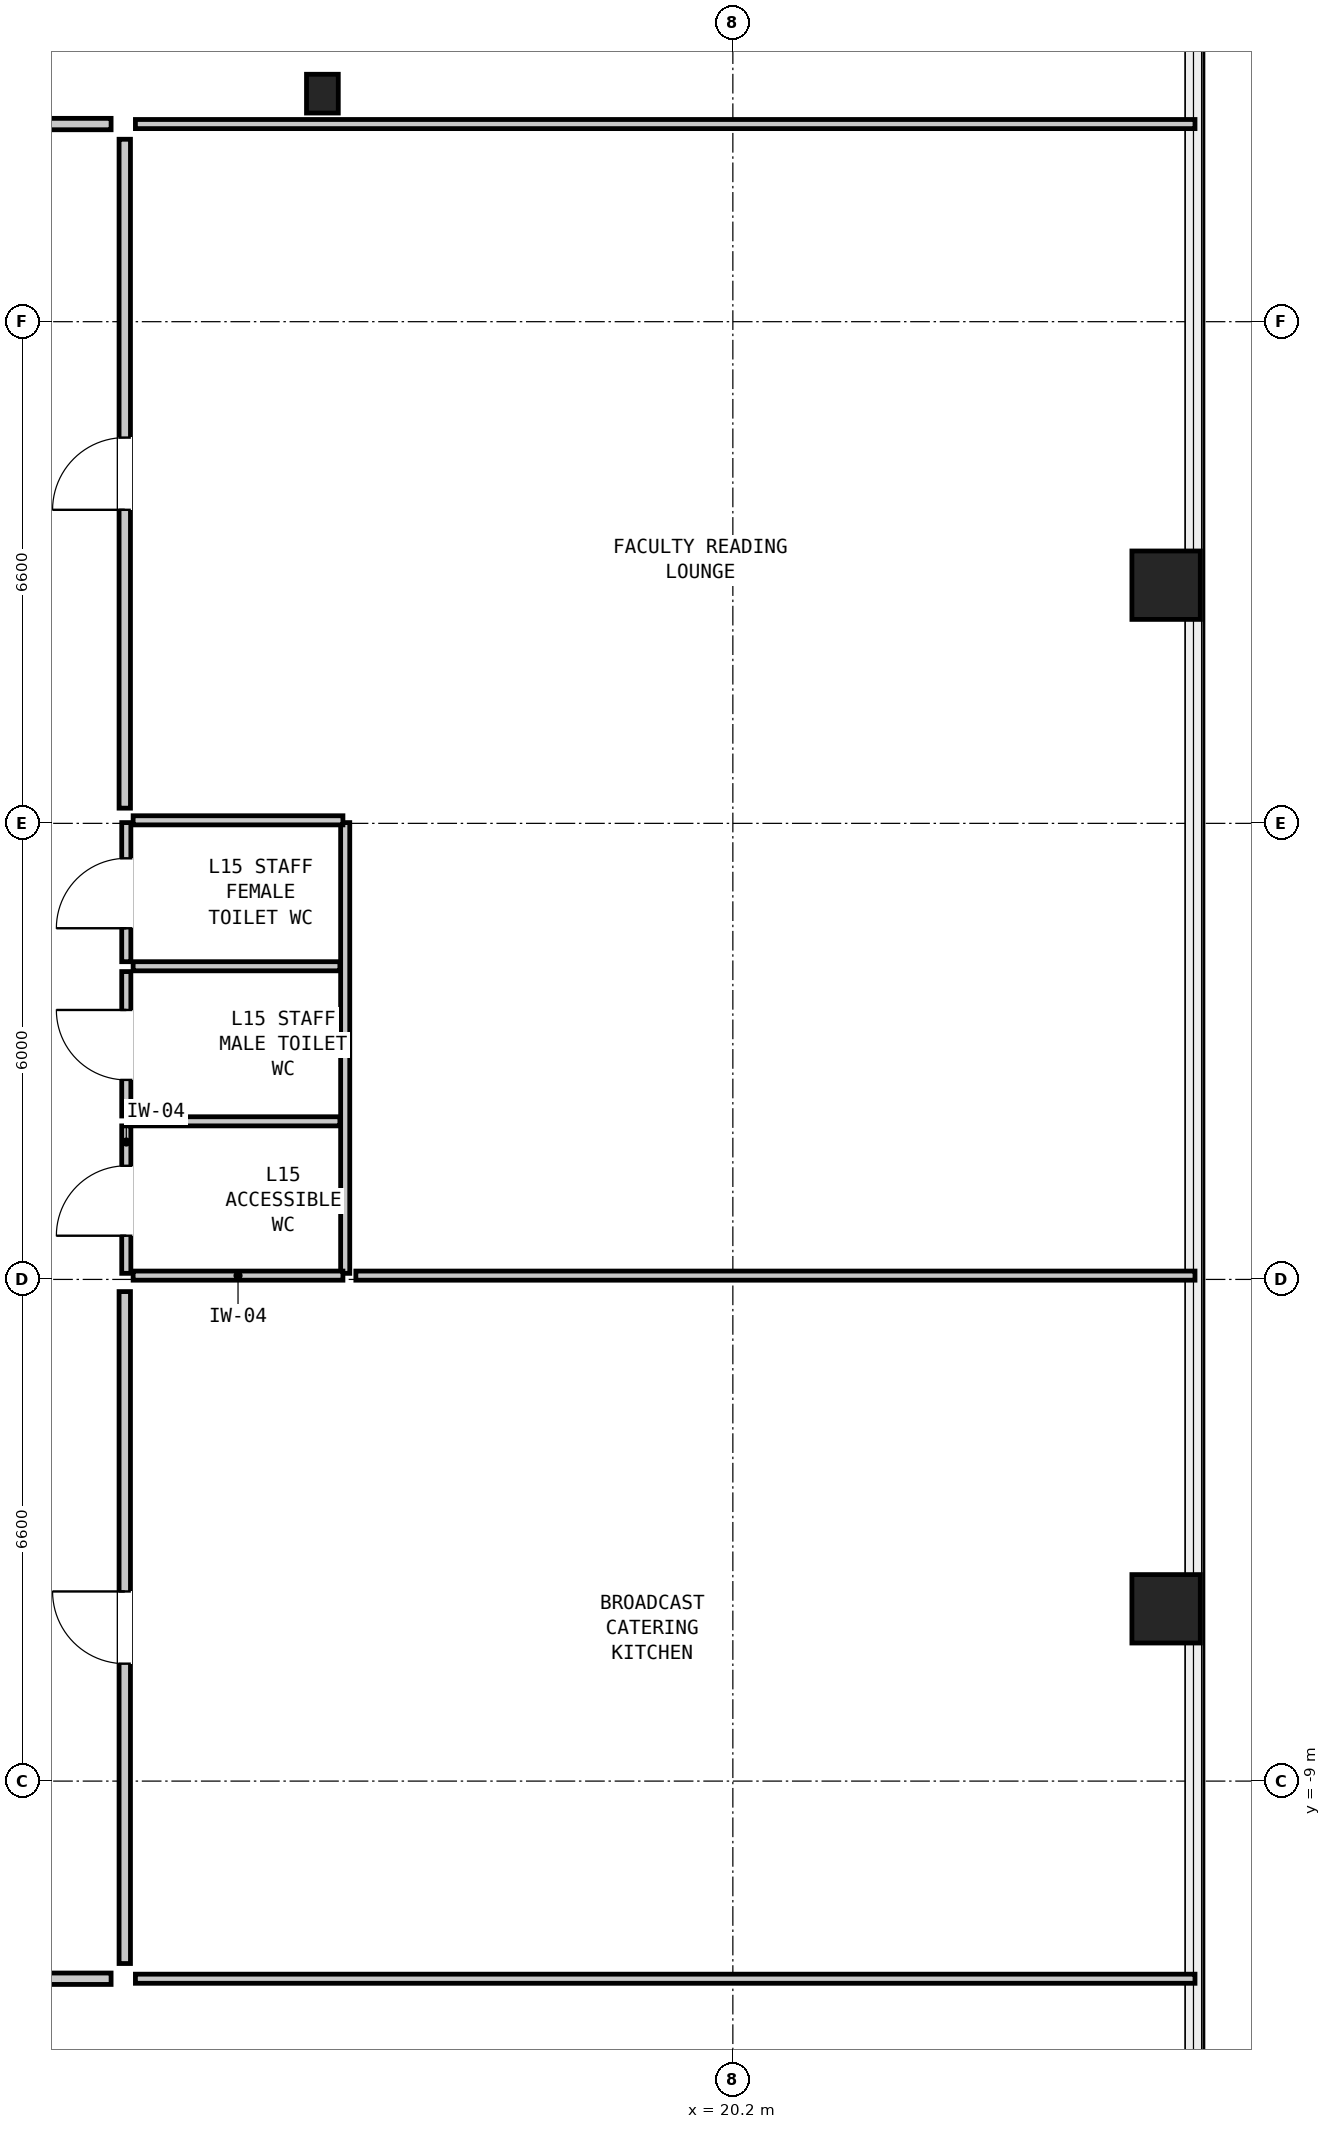
"""IFC4 building model, lengths in metres.
Left out: names, types, materials, properties, quantities, classifications, styles, units other than length and angle.
Written with IfcOpenShell. Run it as: python <this file> out.ifc"""

import sys

from ifc_helpers import new_model, si_unit, direction, frame, frame_2d, origin, origin_2d, place, context, subcontext, project, spatial, rectangle, hollow_rectangle, i_section, extrude, element, fill, save


model = new_model("IFC4")
c1 = context("Model", 3, precision=1e-05, world=origin(), true_north=direction((0.0, 1.0)))
c2 = subcontext(c1, "Body", "Model", "MODEL_VIEW")
j1 = project(units=[si_unit("LENGTHUNIT", "METRE"), si_unit("PLANEANGLEUNIT", "RADIAN")], contexts=[c1])
p1 = place(None, origin())
s1 = spatial("IfcSite", under=j1, at=p1, CompositionType="ELEMENT")
p2 = place(p1, origin())
s2 = spatial("IfcBuilding", under=s1, at=p2, CompositionType="ELEMENT")
p3 = place(p2, frame((0.0, 0.0, 53.55)))
s3 = spatial("IfcBuildingStorey", under=s2, at=p3, CompositionType="ELEMENT", Elevation=53.55)
for number, where, z_axis, x_axis in (
    (1, (25.9, -6.733, 0.0), (0.0, 0.0, 1.0), (0.0, 1.0, 0.0)),
    (2, (25.9, 6.733, 0.0), (0.0, 0.0, 1.0), (0.0, 1.0, 0.0)),
):
    element("IfcColumn", number, at=place(p3, frame(where, z_axis=z_axis, x_axis=x_axis)), inside=s3, PredefinedType="COLUMN", context=c2, shape_type="SweptSolid", body=[
        extrude(hollow_rectangle(XDim=0.9, YDim=0.9, WallThickness=0.055, at=origin_2d()), origin(), (0.0, 0.0, 1.0), 4.35),
    ])
p4 = place(p3, frame((14.8, 13.2, 0.0), z_axis=(0.0, 0.0, 1.0), x_axis=(1.0, 0.0, 0.0)))
e3 = element("IfcColumn", 3, at=p4, inside=s3, PredefinedType="COLUMN", context=c2, shape_type="SweptSolid", body=[
    extrude(i_section(OverallWidth=0.418, OverallDepth=0.51, WebThickness=0.042, FlangeThickness=0.068, at=origin_2d()), origin(), (0.0, 0.0, 1.0), 4.35),
])
p5 = place(p3, frame((12.22, -2.32, 0.0), z_axis=(0.0, 0.0, 1.0), x_axis=(0.0, 1.0, 0.0)))
e4 = element("IfcWall", 4, at=p5, inside=s3, PredefinedType="PARTITIONING", context=c2, shape_type="SweptSolid", body=[
    extrude(rectangle(XDim=1.94, YDim=0.12, at=frame_2d((0.97, 0.0))), origin(), (0.0, 0.0, 1.0), 4.07),
])
p6 = place(p5, frame((0.495, 0.0, 0.0)))
e5 = element("IfcOpeningElement", 5, at=p6, cuts=e4, PredefinedType="OPENING", context=c2, shape_type="SweptSolid", body=[
    extrude(rectangle(XDim=0.92, YDim=2.1, at=frame_2d((0.46, 1.05))), frame((0.0, 0.072, 0.0), z_axis=(0.0, -1.0, 0.0), x_axis=(1.0, 0.0, 0.0)), (0.0, 0.0, 1.0), 0.144),
])
p7 = place(p3, frame((12.22, -0.25, 0.0), z_axis=(0.0, 0.0, 1.0), x_axis=(0.0, 1.0, 0.0)))
e6 = element("IfcWall", 6, at=p7, inside=s3, PredefinedType="PARTITIONING", context=c2, shape_type="SweptSolid", body=[
    extrude(rectangle(XDim=1.9, YDim=0.12, at=frame_2d((0.95, 0.0))), origin(), (0.0, 0.0, 1.0), 4.07),
])
p8 = place(p7, frame((0.475, 0.0, 0.0)))
e7 = element("IfcOpeningElement", 7, at=p8, cuts=e6, PredefinedType="OPENING", context=c2, shape_type="SweptSolid", body=[
    extrude(rectangle(XDim=0.92, YDim=2.1, at=frame_2d((0.46, 1.05))), frame((0.0, 0.072, 0.0), z_axis=(0.0, -1.0, 0.0), x_axis=(1.0, 0.0, 0.0)), (0.0, 0.0, 1.0), 0.144),
])
p9 = place(p3, frame((12.22, 1.78, 0.0), z_axis=(0.0, 0.0, 1.0), x_axis=(0.0, 1.0, 0.0)))
e8 = element("IfcWall", 8, at=p9, inside=s3, PredefinedType="PARTITIONING", context=c2, shape_type="SweptSolid", body=[
    extrude(rectangle(XDim=1.83, YDim=0.12, at=frame_2d((0.915, 0.0))), origin(), (0.0, 0.0, 1.0), 4.07),
])
p10 = place(p9, frame((0.44, 0.0, 0.0)))
e9 = element("IfcOpeningElement", 9, at=p10, cuts=e8, PredefinedType="OPENING", context=c2, shape_type="SweptSolid", body=[
    extrude(rectangle(XDim=0.92, YDim=2.1, at=frame_2d((0.46, 1.05))), frame((0.0, 0.072, 0.0), z_axis=(0.0, -1.0, 0.0), x_axis=(1.0, 0.0, 0.0)), (0.0, 0.0, 1.0), 0.144),
])
p11 = place(p3, frame((15.1, -2.32, 0.0), z_axis=(0.0, 0.0, 1.0), x_axis=(0.0, 1.0, 0.0)))
e10 = element("IfcWall", 10, at=p11, inside=s3, PredefinedType="PARTITIONING", context=c2, shape_type="SweptSolid", body=[
    extrude(rectangle(XDim=5.93, YDim=0.12, at=frame_2d((2.965, 0.0))), origin(), (0.0, 0.0, 1.0), 4.07),
])
for number, where, z_axis, x_axis in (
    (11, (12.31, -2.35, 0.0), (0.0, 0.0, 1.0), (1.0, 0.0, 0.0)),
    (12, (12.31, 3.64, 0.0), (0.0, 0.0, 1.0), (1.0, 0.0, 0.0)),
):
    element("IfcWall", number, at=place(p3, frame(where, z_axis=z_axis, x_axis=x_axis)), inside=s3, PredefinedType="PARTITIONING", context=c2, shape_type="SweptSolid", body=[
        extrude(rectangle(XDim=2.76, YDim=0.12, at=frame_2d((1.38, 0.0))), origin(), (0.0, 0.0, 1.0), 2.25),
    ])
for number, where, z_axis, x_axis in (
    (13, (12.31, -0.32, 0.0), (0.0, 0.0, 1.0), (1.0, 0.0, 0.0)),
    (14, (12.31, 1.72, 0.0), (0.0, 0.0, 1.0), (1.0, 0.0, 0.0)),
):
    element("IfcWall", number, at=place(p3, frame(where, z_axis=z_axis, x_axis=x_axis)), inside=s3, PredefinedType="PARTITIONING", context=c2, shape_type="SweptSolid", body=[
        extrude(rectangle(XDim=2.72, YDim=0.12, at=frame_2d((1.36, 0.0))), origin(), (0.0, 0.0, 1.0), 4.07),
    ])
p12 = place(p3, frame((12.34, 12.8, 0.0), z_axis=(0.0, 0.0, 1.0), x_axis=(1.0, 0.0, 0.0)))
e15 = element("IfcWall", 15, at=p12, inside=s3, PredefinedType="PARTITIONING", context=c2, shape_type="SweptSolid", body=[
    extrude(rectangle(XDim=13.94, YDim=0.12, at=frame_2d((6.97, 0.0))), origin(), (0.0, 0.0, 1.0), 4.07),
])
p13 = place(p3, frame((12.34, -11.6, 0.0), z_axis=(0.0, 0.0, 1.0), x_axis=(1.0, 0.0, 0.0)))
e16 = element("IfcWall", 16, at=p13, inside=s3, PredefinedType="PARTITIONING", context=c2, shape_type="SweptSolid", body=[
    extrude(rectangle(XDim=13.94, YDim=0.12, at=frame_2d((6.97, 0.0))), origin(), (0.0, 0.0, 1.0), 3.288),
])
p14 = place(p3, frame((15.24, -2.35, 0.0), z_axis=(0.0, 0.0, 1.0), x_axis=(1.0, 0.0, 0.0)))
e17 = element("IfcWall", 17, at=p14, inside=s3, PredefinedType="PARTITIONING", context=c2, shape_type="SweptSolid", body=[
    extrude(rectangle(XDim=11.04, YDim=0.12, at=frame_2d((5.52, 0.0))), origin(), (0.0, 0.0, 1.0), 2.25),
])
p15 = place(p3, frame((5.58, 12.8, 0.0), z_axis=(0.0, 0.0, 1.0), x_axis=(1.0, 0.0, 0.0)))
e18 = element("IfcWall", 18, at=p15, inside=s3, PredefinedType="PARTITIONING", context=c2, shape_type="SweptSolid", body=[
    extrude(rectangle(XDim=6.44, YDim=0.15, at=frame_2d((3.22, 0.0))), origin(), (0.0, 0.0, 1.0), 4.07),
])
p16 = place(p15, frame((2.62, 0.0, 0.0)))
e19 = element("IfcOpeningElement", 19, at=p16, cuts=e18, PredefinedType="OPENING", context=c2, shape_type="SweptSolid", body=[
    extrude(rectangle(XDim=1.2, YDim=2.1, at=frame_2d((0.6, 1.05))), frame((0.0, 0.087, 0.0), z_axis=(0.0, -1.0, 0.0), x_axis=(1.0, 0.0, 0.0)), (0.0, 0.0, 1.0), 0.174),
])
p17 = place(p3, frame((0.18, -11.6, 0.0), z_axis=(0.0, 0.0, 1.0), x_axis=(1.0, 0.0, 0.0)))
e20 = element("IfcWall", 20, at=p17, inside=s3, PredefinedType="PARTITIONING", context=c2, shape_type="SweptSolid", body=[
    extrude(rectangle(XDim=11.84, YDim=0.15, at=frame_2d((5.92, 0.0))), origin(), (0.0, 0.0, 1.0), 3.288),
])
p18 = place(p17, frame((5.32, 0.0, 0.0)))
e21 = element("IfcOpeningElement", 21, at=p18, cuts=e20, PredefinedType="OPENING", context=c2, shape_type="SweptSolid", body=[
    extrude(rectangle(XDim=1.2, YDim=2.1, at=frame_2d((0.6, 1.05))), frame((0.0, 0.087, 0.0), z_axis=(0.0, -1.0, 0.0), x_axis=(1.0, 0.0, 0.0)), (0.0, 0.0, 1.0), 0.174),
])
p19 = place(p3, frame((12.2, -11.4, 0.0), z_axis=(0.0, 0.0, 1.0), x_axis=(0.0, 1.0, 0.0)))
e22 = element("IfcWall", 22, at=p19, inside=s3, PredefinedType="PARTITIONING", context=c2, shape_type="SweptSolid", body=[
    extrude(rectangle(XDim=8.84, YDim=0.15, at=frame_2d((4.42, 0.0))), origin(), (0.0, 0.0, 1.0), 4.07),
])
p20 = place(p19, frame((3.945, 0.0, 0.0)))
e23 = element("IfcOpeningElement", 23, at=p20, cuts=e22, PredefinedType="OPENING", context=c2, shape_type="SweptSolid", body=[
    extrude(rectangle(XDim=0.95, YDim=2.1, at=frame_2d((0.475, 1.05))), frame((0.0, 0.087, 0.0), z_axis=(0.0, -1.0, 0.0), x_axis=(1.0, 0.0, 0.0)), (0.0, 0.0, 1.0), 0.174),
])
p21 = place(p3, frame((12.2, 3.8, 0.0), z_axis=(0.0, 0.0, 1.0), x_axis=(0.0, 1.0, 0.0)))
e24 = element("IfcWall", 24, at=p21, inside=s3, PredefinedType="PARTITIONING", context=c2, shape_type="SweptSolid", body=[
    extrude(rectangle(XDim=8.8, YDim=0.15, at=frame_2d((4.4, 0.0))), origin(), (0.0, 0.0, 1.0), 4.07),
])
p22 = place(p21, frame((3.925, 0.0, 0.0)))
e25 = element("IfcOpeningElement", 25, at=p22, cuts=e24, PredefinedType="OPENING", context=c2, shape_type="SweptSolid", body=[
    extrude(rectangle(XDim=0.95, YDim=2.1, at=frame_2d((0.475, 1.05))), frame((0.0, 0.087, 0.0), z_axis=(0.0, -1.0, 0.0), x_axis=(1.0, 0.0, 0.0)), (0.0, 0.0, 1.0), 0.174),
])
p23 = place(p6, origin())
e26 = element("IfcDoor", 26, at=p23, inside=s3, OperationType="SINGLE_SWING_LEFT", PredefinedType="DOOR", context=c2, shape_type="SweptSolid", body=[
    extrude(rectangle(XDim=0.92, YDim=2.1, at=frame_2d((0.46, 1.05))), frame((0.0, 0.025, 0.0), z_axis=(0.0, -1.0, 0.0), x_axis=(1.0, 0.0, 0.0)), (0.0, 0.0, 1.0), 0.05),
])
fill(e5, e26)
p24 = place(p8, origin())
e27 = element("IfcDoor", 27, at=p24, inside=s3, OperationType="SINGLE_SWING_RIGHT", PredefinedType="DOOR", context=c2, shape_type="SweptSolid", body=[
    extrude(rectangle(XDim=0.92, YDim=2.1, at=frame_2d((0.46, 1.05))), frame((0.0, 0.025, 0.0), z_axis=(0.0, -1.0, 0.0), x_axis=(1.0, 0.0, 0.0)), (0.0, 0.0, 1.0), 0.05),
])
fill(e7, e27)
p25 = place(p10, origin())
e28 = element("IfcDoor", 28, at=p25, inside=s3, OperationType="SINGLE_SWING_LEFT", PredefinedType="DOOR", context=c2, shape_type="SweptSolid", body=[
    extrude(rectangle(XDim=0.92, YDim=2.1, at=frame_2d((0.46, 1.05))), frame((0.0, 0.025, 0.0), z_axis=(0.0, -1.0, 0.0), x_axis=(1.0, 0.0, 0.0)), (0.0, 0.0, 1.0), 0.05),
])
fill(e9, e28)
p26 = place(p20, origin())
e29 = element("IfcDoor", 29, at=p26, inside=s3, OperationType="SINGLE_SWING_RIGHT", PredefinedType="DOOR", context=c2, shape_type="SweptSolid", body=[
    extrude(rectangle(XDim=0.95, YDim=2.1, at=frame_2d((0.475, 1.05))), frame((0.0, 0.025, 0.0), z_axis=(0.0, -1.0, 0.0), x_axis=(1.0, 0.0, 0.0)), (0.0, 0.0, 1.0), 0.05),
])
fill(e23, e29)
p27 = place(p22, origin())
e30 = element("IfcDoor", 30, at=p27, inside=s3, OperationType="SINGLE_SWING_LEFT", PredefinedType="DOOR", context=c2, shape_type="SweptSolid", body=[
    extrude(rectangle(XDim=0.95, YDim=2.1, at=frame_2d((0.475, 1.05))), frame((0.0, 0.025, 0.0), z_axis=(0.0, -1.0, 0.0), x_axis=(1.0, 0.0, 0.0)), (0.0, 0.0, 1.0), 0.05),
])
fill(e25, e30)
save(model, sys.argv[1])
